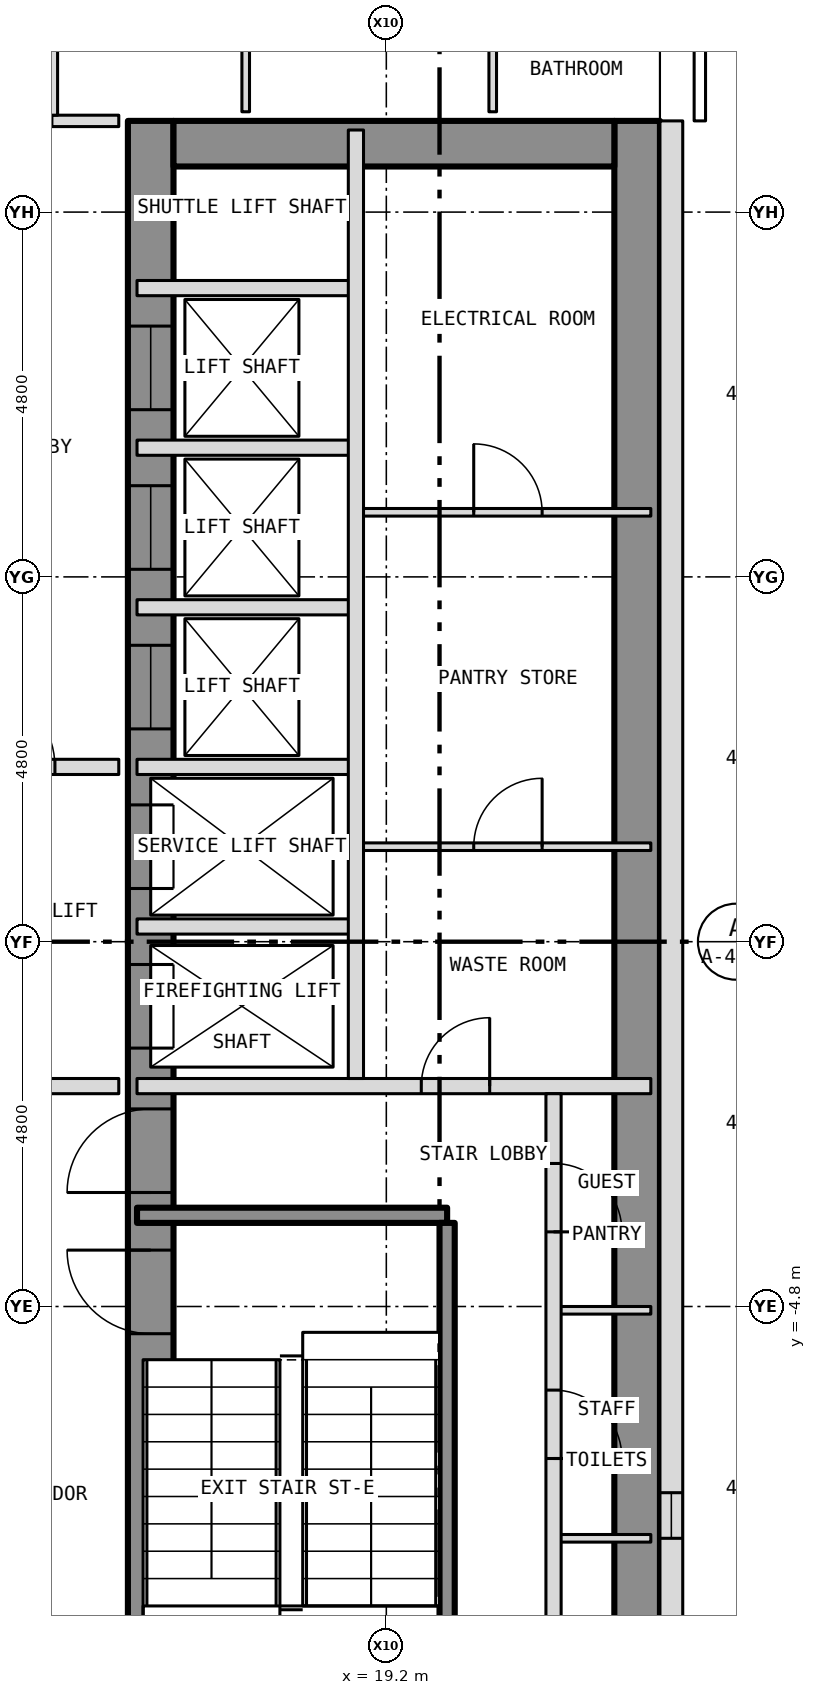
"""IFC4 building model, lengths in metres.
Left out: names, types, materials, properties, quantities, classifications, styles, units other than length and angle.
Written with IfcOpenShell. Run it as: python <this file> out.ifc"""

import sys

from ifc_helpers import new_model, si_unit, direction, frame, frame_2d, origin, place, context, subcontext, project, spatial, rectangle, extrude, element, fill, save


model = new_model("IFC4")
c1 = context("Model", 3, precision=1e-05, world=origin(), true_north=direction((0.0, 1.0)))
c2 = subcontext(c1, "Body", "Model", "MODEL_VIEW")
j1 = project(units=[si_unit("LENGTHUNIT", "METRE"), si_unit("PLANEANGLEUNIT", "RADIAN")], contexts=[c1])
p1 = place(None, origin())
s1 = spatial("IfcSite", under=j1, at=p1, CompositionType="ELEMENT")
p2 = place(p1, origin())
s2 = spatial("IfcBuilding", under=s1, at=p2, CompositionType="ELEMENT")
p3 = place(p2, frame((0.0, 0.0, 106.5)))
s3 = spatial("IfcBuildingStorey", under=s2, at=p3, CompositionType="ELEMENT", Elevation=106.5)
p4 = place(p3, frame((16.1, -10.8, 0.0), z_axis=(0.0, 0.0, 1.0), x_axis=(0.0, 1.0, 0.0)))
e1 = element("IfcWall", 1, at=p4, inside=s3, PredefinedType="SHEAR", context=c2, shape_type="SweptSolid", body=[
    extrude(rectangle(XDim=21.6, YDim=0.6, at=frame_2d((10.8, 0.0))), origin(), (0.0, 0.0, 1.0), 3.25),
])
p5 = place(p4, frame((9.4, 0.0, 0.0)))
e2 = element("IfcOpeningElement", 2, at=p5, cuts=e1, PredefinedType="OPENING", context=c2, shape_type="SweptSolid", body=[
    extrude(rectangle(XDim=1.1, YDim=2.1, at=frame_2d((0.55, 1.05))), frame((0.0, 0.312, 0.0), z_axis=(0.0, -1.0, 0.0), x_axis=(1.0, 0.0, 0.0)), (0.0, 0.0, 1.0), 0.624),
])
p6 = place(p4, frame((11.5, 0.0, 0.0)))
e3 = element("IfcOpeningElement", 3, at=p6, cuts=e1, PredefinedType="OPENING", context=c2, shape_type="SweptSolid", body=[
    extrude(rectangle(XDim=1.1, YDim=2.1, at=frame_2d((0.55, 1.05))), frame((0.0, 0.312, 0.0), z_axis=(0.0, -1.0, 0.0), x_axis=(1.0, 0.0, 0.0)), (0.0, 0.0, 1.0), 0.624),
])
p7 = place(p4, frame((13.6, 0.0, 0.0)))
e4 = element("IfcOpeningElement", 4, at=p7, cuts=e1, PredefinedType="OPENING", context=c2, shape_type="SweptSolid", body=[
    extrude(rectangle(XDim=1.1, YDim=2.1, at=frame_2d((0.55, 1.05))), frame((0.0, 0.312, 0.0), z_axis=(0.0, -1.0, 0.0), x_axis=(1.0, 0.0, 0.0)), (0.0, 0.0, 1.0), 0.624),
])
p8 = place(p4, frame((15.7, 0.0, 0.0)))
e5 = element("IfcOpeningElement", 5, at=p8, cuts=e1, PredefinedType="OPENING", context=c2, shape_type="SweptSolid", body=[
    extrude(rectangle(XDim=1.1, YDim=2.1, at=frame_2d((0.55, 1.05))), frame((0.0, 0.312, 0.0), z_axis=(0.0, -1.0, 0.0), x_axis=(1.0, 0.0, 0.0)), (0.0, 0.0, 1.0), 0.624),
])
p9 = place(p4, frame((17.8, 0.0, 0.0)))
e6 = element("IfcOpeningElement", 6, at=p9, cuts=e1, PredefinedType="OPENING", context=c2, shape_type="SweptSolid", body=[
    extrude(rectangle(XDim=1.1, YDim=2.1, at=frame_2d((0.55, 1.05))), frame((0.0, 0.312, 0.0), z_axis=(0.0, -1.0, 0.0), x_axis=(1.0, 0.0, 0.0)), (0.0, 0.0, 1.0), 0.624),
])
p10 = place(p4, frame((5.642, 0.0, 0.0)))
e7 = element("IfcOpeningElement", 7, at=p10, cuts=e1, PredefinedType="OPENING", context=c2, shape_type="SweptSolid", body=[
    extrude(rectangle(XDim=1.1, YDim=2.1, at=frame_2d((0.55, 1.05))), frame((0.0, 0.312, 0.0), z_axis=(0.0, -1.0, 0.0), x_axis=(1.0, 0.0, 0.0)), (0.0, 0.0, 1.0), 0.624),
])
p11 = place(p4, frame((7.5, 0.0, 0.0)))
e8 = element("IfcOpeningElement", 8, at=p11, cuts=e1, PredefinedType="OPENING", context=c2, shape_type="SweptSolid", body=[
    extrude(rectangle(XDim=1.1, YDim=2.1, at=frame_2d((0.55, 1.05))), frame((0.0, 0.312, 0.0), z_axis=(0.0, -1.0, 0.0), x_axis=(1.0, 0.0, 0.0)), (0.0, 0.0, 1.0), 0.624),
])
p12 = place(p3, frame((22.5, -10.8, 0.0), z_axis=(0.0, 0.0, 1.0), x_axis=(0.0, 1.0, 0.0)))
e9 = element("IfcWall", 9, at=p12, inside=s3, PredefinedType="SHEAR", context=c2, shape_type="SweptSolid", body=[
    extrude(rectangle(XDim=21.6, YDim=0.6, at=frame_2d((10.8, 0.0))), origin(), (0.0, 0.0, 1.0), 3.25),
])
p13 = place(p3, frame((16.4, 10.5, 0.0), z_axis=(0.0, 0.0, 1.0), x_axis=(1.0, 0.0, 0.0)))
e10 = element("IfcWall", 10, at=p13, inside=s3, PredefinedType="SHEAR", context=c2, shape_type="SweptSolid", body=[
    extrude(rectangle(XDim=5.8, YDim=0.6, at=frame_2d((2.9, 0.0))), origin(), (0.0, 0.0, 1.0), 3.25),
])
p14 = place(p3, frame((22.95, -10.8, 0.0), z_axis=(0.0, 0.0, 1.0), x_axis=(0.0, 1.0, 0.0)))
e11 = element("IfcWall", 11, at=p14, inside=s3, PredefinedType="SOLIDWALL", context=c2, shape_type="SweptSolid", body=[
    extrude(rectangle(XDim=21.6, YDim=0.3, at=frame_2d((10.8, 0.0))), origin(), (0.0, 0.0, 1.0), 3.5),
])
p15 = place(p14, frame((2.95, 0.0, 1.0)))
e12 = element("IfcOpeningElement", 12, at=p15, cuts=e11, PredefinedType="OPENING", context=c2, shape_type="SweptSolid", body=[
    extrude(rectangle(XDim=0.6, YDim=1.5, at=frame_2d((0.3, 0.75))), frame((0.0, 0.162, 0.0), z_axis=(0.0, -1.0, 0.0), x_axis=(1.0, 0.0, 0.0)), (0.0, 0.0, 1.0), 0.324),
])
for number, where, z_axis, x_axis in (
    (13, (21.4, -7.85, 0.0), (0.0, 0.0, 1.0), (1.0, 0.0, 0.0)),
    (14, (21.4, -4.85, 0.0), (0.0, 0.0, 1.0), (1.0, 0.0, 0.0)),
):
    element("IfcWall", number, at=place(p3, frame(where, z_axis=z_axis, x_axis=x_axis)), inside=s3, PredefinedType="PARTITIONING", context=c2, shape_type="SweptSolid", body=[
        extrude(rectangle(XDim=1.28, YDim=0.1, at=frame_2d((0.64, 0.0))), origin(), (0.0, 0.0, 1.0), 3.25),
    ])
p16 = place(p3, frame((15.92, -3.6, 0.0), z_axis=(0.0, 0.0, 1.0), x_axis=(1.0, 0.0, 0.0)))
e15 = element("IfcWall", 15, at=p16, inside=s3, PredefinedType="SHEAR", context=c2, shape_type="SweptSolid", body=[
    extrude(rectangle(XDim=4.08, YDim=0.2, at=frame_2d((2.04, 0.0))), origin(), (0.0, 0.0, 1.0), 3.25),
])
p17 = place(p3, frame((12.4, -1.9, 0.0), z_axis=(0.0, 0.0, 1.0), x_axis=(1.0, 0.0, 0.0)))
e16 = element("IfcWall", 16, at=p17, inside=s3, PredefinedType="PARTITIONING", context=c2, shape_type="SweptSolid", body=[
    extrude(rectangle(XDim=3.28, YDim=0.2, at=frame_2d((1.64, 0.0))), origin(), (0.0, 0.0, 1.0), 3.35),
])
p18 = place(p17, frame((1.24, 0.0, 0.0)))
e17 = element("IfcOpeningElement", 17, at=p18, cuts=e16, PredefinedType="OPENING", context=c2, shape_type="SweptSolid", body=[
    extrude(rectangle(XDim=1.1, YDim=2.1, at=frame_2d((0.55, 1.05))), frame((0.0, 0.112, 0.0), z_axis=(0.0, -1.0, 0.0), x_axis=(1.0, 0.0, 0.0)), (0.0, 0.0, 1.0), 0.224),
])
p19 = place(p3, frame((15.92, -1.9, 0.0), z_axis=(0.0, 0.0, 1.0), x_axis=(1.0, 0.0, 0.0)))
e18 = element("IfcWall", 18, at=p19, inside=s3, PredefinedType="PARTITIONING", context=c2, shape_type="SweptSolid", body=[
    extrude(rectangle(XDim=6.76, YDim=0.2, at=frame_2d((3.38, 0.0))), origin(), (0.0, 0.0, 1.0), 3.25),
])
p20 = place(p19, frame((3.74, 0.0, 0.0)))
e19 = element("IfcOpeningElement", 19, at=p20, cuts=e18, PredefinedType="OPENING", context=c2, shape_type="SweptSolid", body=[
    extrude(rectangle(XDim=0.9, YDim=2.1, at=frame_2d((0.45, 1.05))), frame((0.0, 0.112, 0.0), z_axis=(0.0, -1.0, 0.0), x_axis=(1.0, 0.0, 0.0)), (0.0, 0.0, 1.0), 0.224),
])
p21 = place(p3, frame((15.92, 0.2, 0.0), z_axis=(0.0, 0.0, 1.0), x_axis=(1.0, 0.0, 0.0)))
e20 = element("IfcWall", 20, at=p21, inside=s3, PredefinedType="PARTITIONING", context=c2, shape_type="SweptSolid", body=[
    extrude(rectangle(XDim=2.88, YDim=0.2, at=frame_2d((1.44, 0.0))), origin(), (0.0, 0.0, 1.0), 3.25),
])
p22 = place(p3, frame((18.8, 1.25, 0.0), z_axis=(0.0, 0.0, 1.0), x_axis=(1.0, 0.0, 0.0)))
e21 = element("IfcWall", 21, at=p22, inside=s3, PredefinedType="PARTITIONING", context=c2, shape_type="SweptSolid", body=[
    extrude(rectangle(XDim=3.88, YDim=0.1, at=frame_2d((1.94, 0.0))), origin(), (0.0, 0.0, 1.0), 3.25),
])
p23 = place(p22, frame((1.55, 0.0, 0.0)))
e22 = element("IfcOpeningElement", 22, at=p23, cuts=e21, PredefinedType="OPENING", context=c2, shape_type="SweptSolid", body=[
    extrude(rectangle(XDim=0.9, YDim=2.1, at=frame_2d((0.45, 1.05))), frame((0.0, 0.062, 0.0), z_axis=(0.0, -1.0, 0.0), x_axis=(1.0, 0.0, 0.0)), (0.0, 0.0, 1.0), 0.124),
])
p24 = place(p3, frame((12.4, 2.3, 0.0), z_axis=(0.0, 0.0, 1.0), x_axis=(1.0, 0.0, 0.0)))
e23 = element("IfcWall", 23, at=p24, inside=s3, PredefinedType="PARTITIONING", context=c2, shape_type="SweptSolid", body=[
    extrude(rectangle(XDim=3.28, YDim=0.2, at=frame_2d((1.64, 0.0))), origin(), (0.0, 0.0, 1.0), 3.35),
])
p25 = place(p24, frame((1.34, 0.0, 0.0)))
e24 = element("IfcOpeningElement", 24, at=p25, cuts=e23, PredefinedType="OPENING", context=c2, shape_type="SweptSolid", body=[
    extrude(rectangle(XDim=1.1, YDim=2.1, at=frame_2d((0.55, 1.05))), frame((0.0, 0.112, 0.0), z_axis=(0.0, -1.0, 0.0), x_axis=(1.0, 0.0, 0.0)), (0.0, 0.0, 1.0), 0.224),
])
for number, where, z_axis, x_axis in (
    (25, (15.92, 2.3, 0.0), (0.0, 0.0, 1.0), (1.0, 0.0, 0.0)),
    (26, (15.92, 4.4, 0.0), (0.0, 0.0, 1.0), (1.0, 0.0, 0.0)),
):
    element("IfcWall", number, at=place(p3, frame(where, z_axis=z_axis, x_axis=x_axis)), inside=s3, PredefinedType="PARTITIONING", context=c2, shape_type="SweptSolid", body=[
        extrude(rectangle(XDim=2.88, YDim=0.2, at=frame_2d((1.44, 0.0))), origin(), (0.0, 0.0, 1.0), 3.25),
    ])
p26 = place(p3, frame((18.8, 5.65, 0.0), z_axis=(0.0, 0.0, 1.0), x_axis=(1.0, 0.0, 0.0)))
e27 = element("IfcWall", 27, at=p26, inside=s3, PredefinedType="PARTITIONING", context=c2, shape_type="SweptSolid", body=[
    extrude(rectangle(XDim=3.88, YDim=0.1, at=frame_2d((1.94, 0.0))), origin(), (0.0, 0.0, 1.0), 3.25),
])
p27 = place(p26, frame((1.55, 0.0, 0.0)))
e28 = element("IfcOpeningElement", 28, at=p27, cuts=e27, PredefinedType="OPENING", context=c2, shape_type="SweptSolid", body=[
    extrude(rectangle(XDim=0.9, YDim=2.1, at=frame_2d((0.45, 1.05))), frame((0.0, 0.062, 0.0), z_axis=(0.0, -1.0, 0.0), x_axis=(1.0, 0.0, 0.0)), (0.0, 0.0, 1.0), 0.124),
])
for number, where, z_axis, x_axis in (
    (29, (15.92, 6.5, 0.0), (0.0, 0.0, 1.0), (1.0, 0.0, 0.0)),
    (30, (15.92, 8.6, 0.0), (0.0, 0.0, 1.0), (1.0, 0.0, 0.0)),
):
    element("IfcWall", number, at=place(p3, frame(where, z_axis=z_axis, x_axis=x_axis)), inside=s3, PredefinedType="PARTITIONING", context=c2, shape_type="SweptSolid", body=[
        extrude(rectangle(XDim=2.88, YDim=0.2, at=frame_2d((1.44, 0.0))), origin(), (0.0, 0.0, 1.0), 3.25),
    ])
p28 = place(p3, frame((14.8, 10.8, 0.0), z_axis=(0.0, 0.0, 1.0), x_axis=(1.0, 0.0, 0.0)))
e31 = element("IfcWall", 31, at=p28, inside=s3, PredefinedType="PARTITIONING", context=c2, shape_type="SweptSolid", body=[
    extrude(rectangle(XDim=0.88, YDim=0.15, at=frame_2d((0.44, 0.0))), origin(), (0.0, 0.0, 1.0), 3.35),
])
p29 = place(p3, frame((14.8, 10.875, 0.0), z_axis=(0.0, 0.0, 1.0), x_axis=(0.0, 1.0, 0.0)))
e32 = element("IfcWall", 32, at=p29, inside=s3, PredefinedType="PARTITIONING", context=c2, shape_type="SweptSolid", body=[
    extrude(rectangle(XDim=3.85, YDim=0.15, at=frame_2d((1.925, 0.0))), origin(), (0.0, 0.0, 1.0), 3.35),
])
p30 = place(p29, frame((2.325, 0.0, 0.0)))
e33 = element("IfcOpeningElement", 33, at=p30, cuts=e32, PredefinedType="OPENING", context=c2, shape_type="SweptSolid", body=[
    extrude(rectangle(XDim=1.0, YDim=2.1, at=frame_2d((0.5, 1.05))), frame((0.0, 0.087, 0.0), z_axis=(0.0, -1.0, 0.0), x_axis=(1.0, 0.0, 0.0)), (0.0, 0.0, 1.0), 0.174),
])
p31 = place(p3, frame((17.35, 10.92, 0.0), z_axis=(0.0, 0.0, 1.0), x_axis=(0.0, 1.0, 0.0)))
e34 = element("IfcWall", 34, at=p31, inside=s3, PredefinedType="PARTITIONING", context=c2, shape_type="SweptSolid", body=[
    extrude(rectangle(XDim=12.36, YDim=0.1, at=frame_2d((6.18, 0.0))), origin(), (0.0, 0.0, 1.0), 3.35),
])
p32 = place(p31, frame((5.43, 0.0, 0.0)))
e35 = element("IfcOpeningElement", 35, at=p32, cuts=e34, PredefinedType="OPENING", context=c2, shape_type="SweptSolid", body=[
    extrude(rectangle(XDim=0.9, YDim=2.1, at=frame_2d((0.45, 1.05))), frame((0.0, 0.062, 0.0), z_axis=(0.0, -1.0, 0.0), x_axis=(1.0, 0.0, 0.0)), (0.0, 0.0, 1.0), 0.124),
])
p33 = place(p3, frame((18.8, -1.8, 0.0), z_axis=(0.0, 0.0, 1.0), x_axis=(0.0, 1.0, 0.0)))
e36 = element("IfcWall", 36, at=p33, inside=s3, PredefinedType="PARTITIONING", context=c2, shape_type="SweptSolid", body=[
    extrude(rectangle(XDim=12.48, YDim=0.2, at=frame_2d((6.24, 0.0))), origin(), (0.0, 0.0, 1.0), 3.25),
])
p34 = place(p3, frame((20.0, -10.68, 0.0), z_axis=(0.0, 0.0, 1.0), x_axis=(0.0, 1.0, 0.0)))
e37 = element("IfcWall", 37, at=p34, inside=s3, PredefinedType="SHEAR", context=c2, shape_type="SweptSolid", body=[
    extrude(rectangle(XDim=6.98, YDim=0.2, at=frame_2d((3.49, 0.0))), origin(), (0.0, 0.0, 1.0), 3.25),
])
p35 = place(p3, frame((20.6, 10.92, 0.0), z_axis=(0.0, 0.0, 1.0), x_axis=(0.0, 1.0, 0.0)))
e38 = element("IfcWall", 38, at=p35, inside=s3, PredefinedType="PARTITIONING", context=c2, shape_type="SweptSolid", body=[
    extrude(rectangle(XDim=3.03, YDim=0.1, at=frame_2d((1.515, 0.0))), origin(), (0.0, 0.0, 1.0), 3.35),
])
p36 = place(p35, frame((1.67, 0.0, 0.0)))
e39 = element("IfcOpeningElement", 39, at=p36, cuts=e38, PredefinedType="OPENING", context=c2, shape_type="SweptSolid", body=[
    extrude(rectangle(XDim=0.9, YDim=2.1, at=frame_2d((0.45, 1.05))), frame((0.0, 0.062, 0.0), z_axis=(0.0, -1.0, 0.0), x_axis=(1.0, 0.0, 0.0)), (0.0, 0.0, 1.0), 0.124),
])
p37 = place(p3, frame((21.4, -10.68, 0.0), z_axis=(0.0, 0.0, 1.0), x_axis=(0.0, 1.0, 0.0)))
e40 = element("IfcWall", 40, at=p37, inside=s3, PredefinedType="PARTITIONING", context=c2, shape_type="SweptSolid", body=[
    extrude(rectangle(XDim=8.68, YDim=0.2, at=frame_2d((4.34, 0.0))), origin(), (0.0, 0.0, 1.0), 3.25),
])
p38 = place(p37, frame((0.899, 0.0, 0.0)))
e41 = element("IfcOpeningElement", 41, at=p38, cuts=e40, PredefinedType="OPENING", context=c2, shape_type="SweptSolid", body=[
    extrude(rectangle(XDim=0.9, YDim=2.1, at=frame_2d((0.45, 1.05))), frame((0.0, 0.112, 0.0), z_axis=(0.0, -1.0, 0.0), x_axis=(1.0, 0.0, 0.0)), (0.0, 0.0, 1.0), 0.224),
])
p39 = place(p37, frame((3.88, 0.0, 0.0)))
e42 = element("IfcOpeningElement", 42, at=p39, cuts=e40, PredefinedType="OPENING", context=c2, shape_type="SweptSolid", body=[
    extrude(rectangle(XDim=0.9, YDim=2.1, at=frame_2d((0.45, 1.05))), frame((0.0, 0.112, 0.0), z_axis=(0.0, -1.0, 0.0), x_axis=(1.0, 0.0, 0.0)), (0.0, 0.0, 1.0), 0.224),
])
p40 = place(p37, frame((6.862, 0.0, 0.0)))
e43 = element("IfcOpeningElement", 43, at=p40, cuts=e40, PredefinedType="OPENING", context=c2, shape_type="SweptSolid", body=[
    extrude(rectangle(XDim=0.9, YDim=2.1, at=frame_2d((0.45, 1.05))), frame((0.0, 0.112, 0.0), z_axis=(0.0, -1.0, 0.0), x_axis=(1.0, 0.0, 0.0)), (0.0, 0.0, 1.0), 0.224),
])
p41 = place(p15, origin())
e44 = element("IfcWindow", 44, at=p41, inside=s3, PartitioningType="SINGLE_PANEL", PredefinedType="WINDOW", context=c2, shape_type="SweptSolid", body=[
    extrude(rectangle(XDim=0.6, YDim=1.5, at=frame_2d((0.3, 0.75))), frame((0.0, -0.06, 0.0), z_axis=(0.0, -1.0, 0.0), x_axis=(1.0, 0.0, 0.0)), (0.0, 0.0, 1.0), 0.06),
])
fill(e12, e44)
p42 = place(p5, origin())
e45 = element("IfcDoor", 45, at=p42, inside=s3, OperationType="SLIDING_TO_LEFT", PredefinedType="DOOR", context=c2, shape_type="SweptSolid", body=[
    extrude(rectangle(XDim=1.1, YDim=2.1, at=frame_2d((0.55, 1.05))), frame((0.0, 0.025, 0.0), z_axis=(0.0, -1.0, 0.0), x_axis=(1.0, 0.0, 0.0)), (0.0, 0.0, 1.0), 0.05),
])
fill(e2, e45)
p43 = place(p6, origin())
e46 = element("IfcDoor", 46, at=p43, inside=s3, OperationType="SLIDING_TO_LEFT", PredefinedType="DOOR", context=c2, shape_type="SweptSolid", body=[
    extrude(rectangle(XDim=1.1, YDim=2.1, at=frame_2d((0.55, 1.05))), frame((0.0, 0.025, 0.0), z_axis=(0.0, -1.0, 0.0), x_axis=(1.0, 0.0, 0.0)), (0.0, 0.0, 1.0), 0.05),
])
fill(e3, e46)
p44 = place(p7, origin())
e47 = element("IfcDoor", 47, at=p44, inside=s3, OperationType="SLIDING_TO_LEFT", PredefinedType="DOOR", context=c2, shape_type="SweptSolid", body=[
    extrude(rectangle(XDim=1.1, YDim=2.1, at=frame_2d((0.55, 1.05))), frame((0.0, 0.025, 0.0), z_axis=(0.0, -1.0, 0.0), x_axis=(1.0, 0.0, 0.0)), (0.0, 0.0, 1.0), 0.05),
])
fill(e4, e47)
p45 = place(p8, origin())
e48 = element("IfcDoor", 48, at=p45, inside=s3, OperationType="SLIDING_TO_LEFT", PredefinedType="DOOR", context=c2, shape_type="SweptSolid", body=[
    extrude(rectangle(XDim=1.1, YDim=2.1, at=frame_2d((0.55, 1.05))), frame((0.0, 0.025, 0.0), z_axis=(0.0, -1.0, 0.0), x_axis=(1.0, 0.0, 0.0)), (0.0, 0.0, 1.0), 0.05),
])
fill(e5, e48)
p46 = place(p9, origin())
e49 = element("IfcDoor", 49, at=p46, inside=s3, OperationType="SLIDING_TO_LEFT", PredefinedType="DOOR", context=c2, shape_type="SweptSolid", body=[
    extrude(rectangle(XDim=1.1, YDim=2.1, at=frame_2d((0.55, 1.05))), frame((0.0, 0.025, 0.0), z_axis=(0.0, -1.0, 0.0), x_axis=(1.0, 0.0, 0.0)), (0.0, 0.0, 1.0), 0.05),
])
fill(e6, e49)
p47 = place(p10, origin())
e50 = element("IfcDoor", 50, at=p47, inside=s3, OperationType="SINGLE_SWING_RIGHT", PredefinedType="DOOR", context=c2, shape_type="SweptSolid", body=[
    extrude(rectangle(XDim=1.1, YDim=2.1, at=frame_2d((0.55, 1.05))), frame((0.0, 0.025, 0.0), z_axis=(0.0, -1.0, 0.0), x_axis=(1.0, 0.0, 0.0)), (0.0, 0.0, 1.0), 0.05),
])
fill(e7, e50)
p48 = place(p11, origin())
e51 = element("IfcDoor", 51, at=p48, inside=s3, OperationType="SINGLE_SWING_LEFT", PredefinedType="DOOR", context=c2, shape_type="SweptSolid", body=[
    extrude(rectangle(XDim=1.1, YDim=2.1, at=frame_2d((0.55, 1.05))), frame((0.0, 0.025, 0.0), z_axis=(0.0, -1.0, 0.0), x_axis=(1.0, 0.0, 0.0)), (0.0, 0.0, 1.0), 0.05),
])
fill(e8, e51)
p49 = place(p39, origin())
e52 = element("IfcDoor", 52, at=p49, inside=s3, OperationType="SINGLE_SWING_LEFT", PredefinedType="DOOR", context=c2, shape_type="SweptSolid", body=[
    extrude(rectangle(XDim=0.9, YDim=2.1, at=frame_2d((0.45, 1.05))), frame((0.0, 0.025, 0.0), z_axis=(0.0, -1.0, 0.0), x_axis=(1.0, 0.0, 0.0)), (0.0, 0.0, 1.0), 0.05),
])
fill(e42, e52)
p50 = place(p40, origin())
e53 = element("IfcDoor", 53, at=p50, inside=s3, OperationType="SINGLE_SWING_LEFT", PredefinedType="DOOR", context=c2, shape_type="SweptSolid", body=[
    extrude(rectangle(XDim=0.9, YDim=2.1, at=frame_2d((0.45, 1.05))), frame((0.0, 0.025, 0.0), z_axis=(0.0, -1.0, 0.0), x_axis=(1.0, 0.0, 0.0)), (0.0, 0.0, 1.0), 0.05),
])
fill(e43, e53)
p51 = place(p20, origin())
e54 = element("IfcDoor", 54, at=p51, inside=s3, OperationType="SINGLE_SWING_RIGHT", PredefinedType="DOOR", context=c2, shape_type="SweptSolid", body=[
    extrude(rectangle(XDim=0.9, YDim=2.1, at=frame_2d((0.45, 1.05))), frame((0.0, 0.025, 0.0), z_axis=(0.0, -1.0, 0.0), x_axis=(1.0, 0.0, 0.0)), (0.0, 0.0, 1.0), 0.05),
])
fill(e19, e54)
p52 = place(p23, origin())
e55 = element("IfcDoor", 55, at=p52, inside=s3, OperationType="SINGLE_SWING_RIGHT", PredefinedType="DOOR", context=c2, shape_type="SweptSolid", body=[
    extrude(rectangle(XDim=0.9, YDim=2.1, at=frame_2d((0.45, 1.05))), frame((0.0, 0.025, 0.0), z_axis=(0.0, -1.0, 0.0), x_axis=(1.0, 0.0, 0.0)), (0.0, 0.0, 1.0), 0.05),
])
fill(e22, e55)
p53 = place(p27, origin())
e56 = element("IfcDoor", 56, at=p53, inside=s3, OperationType="SINGLE_SWING_LEFT", PredefinedType="DOOR", context=c2, shape_type="SweptSolid", body=[
    extrude(rectangle(XDim=0.9, YDim=2.1, at=frame_2d((0.45, 1.05))), frame((0.0, 0.025, 0.0), z_axis=(0.0, -1.0, 0.0), x_axis=(1.0, 0.0, 0.0)), (0.0, 0.0, 1.0), 0.05),
])
fill(e28, e56)
p54 = place(p25, origin())
e57 = element("IfcDoor", 57, at=p54, inside=s3, OperationType="SINGLE_SWING_LEFT", PredefinedType="DOOR", context=c2, shape_type="SweptSolid", body=[
    extrude(rectangle(XDim=1.1, YDim=2.1, at=frame_2d((0.55, 1.05))), frame((0.0, 0.025, 0.0), z_axis=(0.0, -1.0, 0.0), x_axis=(1.0, 0.0, 0.0)), (0.0, 0.0, 1.0), 0.05),
])
fill(e24, e57)
save(model, sys.argv[1])
